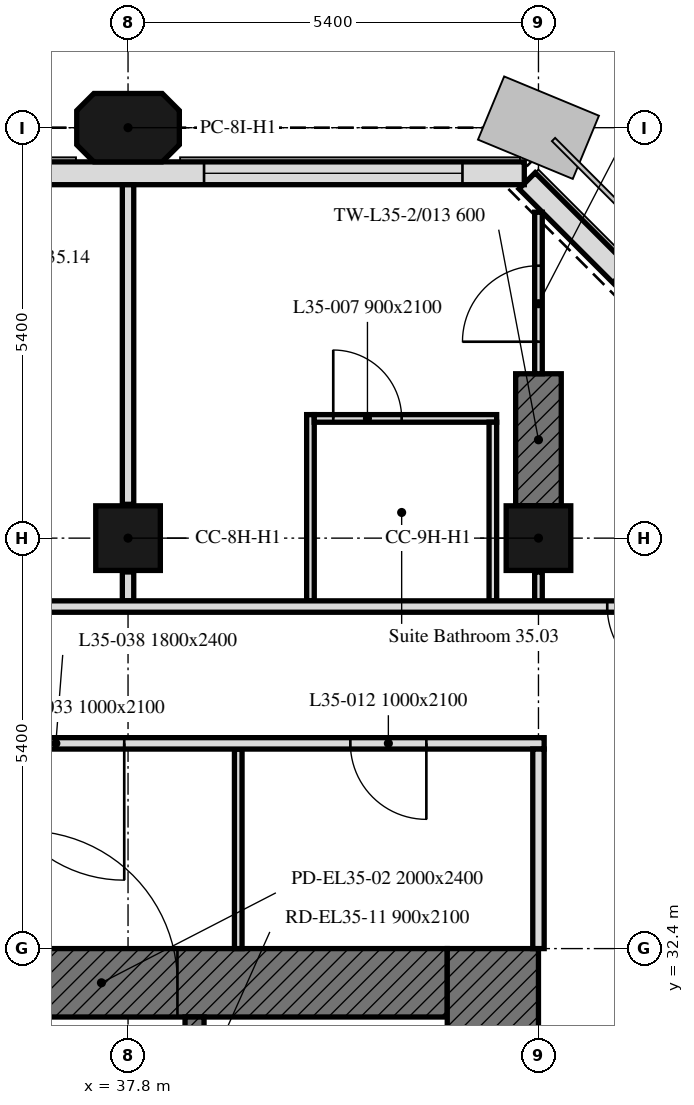
"""IFC4 building model, lengths in metres.
Left out: names, types, materials, properties, quantities, classifications, styles, units other than length and angle.
Written with IfcOpenShell. Run it as: python <this file> out.ifc"""

import sys

from ifc_helpers import new_model, si_unit, direction, frame, frame_2d, origin, origin_2d, place, context, subcontext, project, spatial, polyline, rectangle, outline, extrude, element, fill, save


model = new_model("IFC4")
c1 = context("Model", 3, precision=1e-05, world=origin(), true_north=direction((0.0, 1.0)))
c2 = subcontext(c1, "Body", "Model", "MODEL_VIEW")
j1 = project(units=[si_unit("LENGTHUNIT", "METRE"), si_unit("PLANEANGLEUNIT", "RADIAN")], contexts=[c1])
p1 = place(None, origin())
s1 = spatial("IfcSite", under=j1, at=p1, CompositionType="ELEMENT")
p2 = place(p1, origin())
s2 = spatial("IfcBuilding", under=s1, at=p2, CompositionType="ELEMENT")
p3 = place(p2, frame((0.0, 0.0, 152.8)))
s3 = spatial("IfcBuildingStorey", under=s2, at=p3, CompositionType="ELEMENT", Elevation=152.8)
for number, where, z_axis, x_axis in (
    (1, (37.8, 37.8, 0.0), (0.0, 0.0, 1.0), (1.0, 0.0, 0.0)),
    (2, (43.2, 37.8, 0.0), (0.0, 0.0, 1.0), (1.0, 0.0, 0.0)),
):
    element("IfcColumn", number, at=place(p3, frame(where, z_axis=z_axis, x_axis=x_axis)), inside=s3, PredefinedType="COLUMN", context=c2, shape_type="SweptSolid", body=[
        extrude(rectangle(XDim=0.85, YDim=0.85, at=origin_2d()), origin(), (0.0, 0.0, 1.0), 3.0),
    ])
p4 = place(p3, frame((37.8, 43.2, 0.0), z_axis=(0.0, 0.0, 1.0), x_axis=(1.0, 0.0, 0.0)))
e3 = element("IfcColumn", 3, at=p4, inside=s3, PredefinedType="COLUMN", context=c2, shape_type="SweptSolid", body=[
    extrude(outline(polyline([(-0.45, -0.45), (0.45, -0.45), (0.675, -0.225), (0.675, 0.225), (0.45, 0.45), (-0.45, 0.45), (-0.675, 0.225), (-0.675, -0.225), (-0.45, -0.45)])), origin(), (0.0, 0.0, 1.0), 3.0),
])
p5 = place(p3, frame((43.2, 38.225, 0.0), z_axis=(0.0, 0.0, 1.0), x_axis=(0.0, 1.0, 0.0)))
e4 = element("IfcWall", 4, at=p5, inside=s3, PredefinedType="SHEAR", context=c2, shape_type="SweptSolid", body=[
    extrude(rectangle(XDim=1.737, YDim=0.6, at=frame_2d((0.869, 0.0))), origin(), (0.0, 0.0, 1.0), 3.0),
])
p6 = place(p3, frame((47.901, 37.65, 0.0), z_axis=(0.0, 0.0, 1.0), x_axis=(-0.707106781187, 0.707106781187, 0.0)))
e5 = element("IfcWall", 5, at=p6, inside=s3, PredefinedType="SOLIDWALL", context=c2, shape_type="SweptSolid", body=[
    extrude(rectangle(XDim=6.86, YDim=0.3, at=frame_2d((3.43, 0.0))), origin(), (0.0, 0.0, 1.0), 3.0),
])
p7 = place(p6, frame((1.73, 0.0, 0.9)))
e6 = element("IfcOpeningElement", 6, at=p7, cuts=e5, PredefinedType="OPENING", context=c2, shape_type="SweptSolid", body=[
    extrude(rectangle(XDim=3.4, YDim=1.7, at=frame_2d((1.7, 0.85))), frame((0.0, 0.16, 0.0), z_axis=(0.0, -1.0, 0.0), x_axis=(1.0, 0.0, 0.0)), (0.0, 0.0, 1.0), 0.32),
])
p8 = place(p3, frame((43.014, 42.6, 0.0), z_axis=(0.0, 0.0, 1.0), x_axis=(-1.0, 0.0, 0.0)))
e7 = element("IfcWall", 7, at=p8, inside=s3, PredefinedType="SOLIDWALL", context=c2, shape_type="SweptSolid", body=[
    extrude(rectangle(XDim=32.027, YDim=0.3, at=frame_2d((16.014, 0.0))), origin(), (0.0, 0.0, 1.0), 3.0),
])
p9 = place(p8, frame((0.814, 0.0, 0.9)))
e8 = element("IfcOpeningElement", 8, at=p9, cuts=e7, PredefinedType="OPENING", context=c2, shape_type="SweptSolid", body=[
    extrude(rectangle(XDim=3.4, YDim=1.7, at=frame_2d((1.7, 0.85))), frame((0.0, 0.16, 0.0), z_axis=(0.0, -1.0, 0.0), x_axis=(1.0, 0.0, 0.0)), (0.0, 0.0, 1.0), 0.32),
])
p10 = place(p8, frame((6.564, 0.0, 0.9)))
e9 = element("IfcOpeningElement", 9, at=p10, cuts=e7, PredefinedType="OPENING", context=c2, shape_type="SweptSolid", body=[
    extrude(rectangle(XDim=1.1, YDim=1.7, at=frame_2d((0.55, 0.85))), frame((0.0, 0.16, 0.0), z_axis=(0.0, -1.0, 0.0), x_axis=(1.0, 0.0, 0.0)), (0.0, 0.0, 1.0), 0.32),
])
p11 = place(p8, frame((11.614, 0.0, 0.9)))
e10 = element("IfcOpeningElement", 10, at=p11, cuts=e7, PredefinedType="OPENING", context=c2, shape_type="SweptSolid", body=[
    extrude(rectangle(XDim=3.4, YDim=1.7, at=frame_2d((1.7, 0.85))), frame((0.0, 0.16, 0.0), z_axis=(0.0, -1.0, 0.0), x_axis=(1.0, 0.0, 0.0)), (0.0, 0.0, 1.0), 0.32),
])
p12 = place(p8, frame((17.364, 0.0, 0.9)))
e11 = element("IfcOpeningElement", 11, at=p12, cuts=e7, PredefinedType="OPENING", context=c2, shape_type="SweptSolid", body=[
    extrude(rectangle(XDim=1.1, YDim=1.7, at=frame_2d((0.55, 0.85))), frame((0.0, 0.16, 0.0), z_axis=(0.0, -1.0, 0.0), x_axis=(1.0, 0.0, 0.0)), (0.0, 0.0, 1.0), 0.32),
])
p13 = place(p8, frame((22.414, 0.0, 0.9)))
e12 = element("IfcOpeningElement", 12, at=p13, cuts=e7, PredefinedType="OPENING", context=c2, shape_type="SweptSolid", body=[
    extrude(rectangle(XDim=3.4, YDim=1.7, at=frame_2d((1.7, 0.85))), frame((0.0, 0.16, 0.0), z_axis=(0.0, -1.0, 0.0), x_axis=(1.0, 0.0, 0.0)), (0.0, 0.0, 1.0), 0.32),
])
p14 = place(p8, frame((28.164, 0.0, 0.9)))
e13 = element("IfcOpeningElement", 13, at=p14, cuts=e7, PredefinedType="OPENING", context=c2, shape_type="SweptSolid", body=[
    extrude(rectangle(XDim=1.1, YDim=1.7, at=frame_2d((0.55, 0.85))), frame((0.0, 0.16, 0.0), z_axis=(0.0, -1.0, 0.0), x_axis=(1.0, 0.0, 0.0)), (0.0, 0.0, 1.0), 0.32),
])
p15 = place(p3, frame((30.9, 31.95, 0.0), z_axis=(0.0, 0.0, 1.0), x_axis=(1.0, 0.0, 0.0)))
e14 = element("IfcWall", 14, at=p15, inside=s3, PredefinedType="SOLIDWALL", context=c2, shape_type="SweptSolid", body=[
    extrude(rectangle(XDim=11.1, YDim=0.9, at=frame_2d((5.55, 0.0))), origin(), (0.0, 0.0, 1.0), 3.0),
])
p16 = place(p15, frame((5.55, 0.0, 0.0)))
e15 = element("IfcOpeningElement", 15, at=p16, cuts=e14, PredefinedType="OPENING", context=c2, shape_type="SweptSolid", body=[
    extrude(rectangle(XDim=2.0, YDim=2.4, at=frame_2d((1.0, 1.2))), frame((0.0, 0.45, 0.0), z_axis=(0.0, -1.0, 0.0), x_axis=(1.0, 0.0, 0.0)), (0.0, 0.0, 1.0), 0.9),
])
p17 = place(p3, frame((42.6, 32.4, 0.0), z_axis=(0.0, 0.0, 1.0), x_axis=(0.0, -1.0, 0.0)))
e16 = element("IfcWall", 16, at=p17, inside=s3, PredefinedType="SOLIDWALL", context=c2, shape_type="SweptSolid", body=[
    extrude(rectangle(XDim=16.2, YDim=1.2, at=frame_2d((8.1, 0.0))), origin(), (0.0, 0.0, 1.0), 3.0),
])
p18 = place(p3, frame((38.675, 17.1, 0.0), z_axis=(0.0, 0.0, 1.0), x_axis=(0.0, 1.0, 0.0)))
e17 = element("IfcWall", 17, at=p18, inside=s3, PredefinedType="SOLIDWALL", context=c2, shape_type="SweptSolid", body=[
    extrude(rectangle(XDim=14.4, YDim=0.25, at=frame_2d((7.2, 0.0))), origin(), (0.0, 0.0, 1.0), 3.0),
])
p19 = place(p18, frame((4.6, 0.0, 0.0)))
e18 = element("IfcOpeningElement", 18, at=p19, cuts=e17, PredefinedType="OPENING", context=c2, shape_type="SweptSolid", body=[
    extrude(rectangle(XDim=1.0, YDim=2.1, at=frame_2d((0.5, 1.05))), frame((0.0, 0.125, 0.0), z_axis=(0.0, -1.0, 0.0), x_axis=(1.0, 0.0, 0.0)), (0.0, 0.0, 1.0), 0.25),
])
p20 = place(p18, frame((7.062, 0.0, 0.0)))
e19 = element("IfcOpeningElement", 19, at=p20, cuts=e17, PredefinedType="OPENING", context=c2, shape_type="SweptSolid", body=[
    extrude(rectangle(XDim=1.2, YDim=2.1, at=frame_2d((0.6, 1.05))), frame((0.0, 0.125, 0.0), z_axis=(0.0, -1.0, 0.0), x_axis=(1.0, 0.0, 0.0)), (0.0, 0.0, 1.0), 0.25),
])
p21 = place(p18, frame((9.599, 0.0, 0.0)))
e20 = element("IfcOpeningElement", 20, at=p21, cuts=e17, PredefinedType="OPENING", context=c2, shape_type="SweptSolid", body=[
    extrude(rectangle(XDim=0.9, YDim=2.1, at=frame_2d((0.45, 1.05))), frame((0.0, 0.125, 0.0), z_axis=(0.0, -1.0, 0.0), x_axis=(1.0, 0.0, 0.0)), (0.0, 0.0, 1.0), 0.25),
])
p22 = place(p18, frame((11.032, 0.0, 0.0)))
e21 = element("IfcOpeningElement", 21, at=p22, cuts=e17, PredefinedType="OPENING", context=c2, shape_type="SweptSolid", body=[
    extrude(rectangle(XDim=0.9, YDim=2.1, at=frame_2d((0.45, 1.05))), frame((0.0, 0.125, 0.0), z_axis=(0.0, -1.0, 0.0), x_axis=(1.0, 0.0, 0.0)), (0.0, 0.0, 1.0), 0.25),
])
p23 = place(p18, frame((12.846, 0.0, 0.0)))
e22 = element("IfcOpeningElement", 22, at=p23, cuts=e17, PredefinedType="OPENING", context=c2, shape_type="SweptSolid", body=[
    extrude(rectangle(XDim=0.9, YDim=2.1, at=frame_2d((0.45, 1.05))), frame((0.0, 0.125, 0.0), z_axis=(0.0, -1.0, 0.0), x_axis=(1.0, 0.0, 0.0)), (0.0, 0.0, 1.0), 0.25),
])
p24 = place(p3, frame((37.8, 36.975, 0.0), z_axis=(0.0, 0.0, 1.0), x_axis=(0.0, 1.0, 0.0)))
e23 = element("IfcWall", 23, at=p24, inside=s3, PredefinedType="PARTITIONING", context=c2, shape_type="SweptSolid", body=[
    extrude(rectangle(XDim=0.38, YDim=0.15, at=frame_2d((0.19, 0.0))), origin(), (0.0, 0.0, 1.0), 3.0),
])
p25 = place(p3, frame((37.8, 38.245, 0.0), z_axis=(0.0, 0.0, 1.0), x_axis=(0.0, 1.0, 0.0)))
e24 = element("IfcWall", 24, at=p25, inside=s3, PredefinedType="PARTITIONING", context=c2, shape_type="SweptSolid", body=[
    extrude(rectangle(XDim=4.204, YDim=0.15, at=frame_2d((2.102, 0.0))), origin(), (0.0, 0.0, 1.0), 3.0),
])
p26 = place(p3, frame((40.2, 36.975, 0.0), z_axis=(0.0, 0.0, 1.0), x_axis=(0.0, 1.0, 0.0)))
e25 = element("IfcWall", 25, at=p26, inside=s3, PredefinedType="PARTITIONING", context=c2, shape_type="SweptSolid", body=[
    extrude(rectangle(XDim=2.45, YDim=0.1, at=frame_2d((1.225, 0.0))), origin(), (0.0, 0.0, 1.0), 3.0),
])
p27 = place(p3, frame((40.25, 39.375, 0.0), z_axis=(0.0, 0.0, 1.0), x_axis=(1.0, 0.0, 0.0)))
e26 = element("IfcWall", 26, at=p27, inside=s3, PredefinedType="PARTITIONING", context=c2, shape_type="SweptSolid", body=[
    extrude(rectangle(XDim=2.4, YDim=0.1, at=frame_2d((1.2, 0.0))), origin(), (0.0, 0.0, 1.0), 3.0),
])
p28 = place(p27, frame((0.25, 0.0, 0.0)))
e27 = element("IfcOpeningElement", 27, at=p28, cuts=e26, PredefinedType="OPENING", context=c2, shape_type="SweptSolid", body=[
    extrude(rectangle(XDim=0.9, YDim=2.1, at=frame_2d((0.45, 1.05))), frame((0.0, 0.05, 0.0), z_axis=(0.0, -1.0, 0.0), x_axis=(1.0, 0.0, 0.0)), (0.0, 0.0, 1.0), 0.1),
])
p29 = place(p3, frame((42.6, 39.325, 0.0), z_axis=(0.0, 0.0, 1.0), x_axis=(0.0, -1.0, 0.0)))
e28 = element("IfcWall", 28, at=p29, inside=s3, PredefinedType="PARTITIONING", context=c2, shape_type="SweptSolid", body=[
    extrude(rectangle(XDim=2.35, YDim=0.1, at=frame_2d((1.175, 0.0))), origin(), (0.0, 0.0, 1.0), 3.0),
])
p30 = place(p3, frame((43.2, 36.975, 0.0), z_axis=(0.0, 0.0, 1.0), x_axis=(0.0, 1.0, 0.0)))
e29 = element("IfcWall", 29, at=p30, inside=s3, PredefinedType="PARTITIONING", context=c2, shape_type="SweptSolid", body=[
    extrude(rectangle(XDim=0.38, YDim=0.1, at=frame_2d((0.19, 0.0))), origin(), (0.0, 0.0, 1.0), 3.0),
])
p31 = place(p3, frame((43.2, 39.962, 0.0), z_axis=(0.0, 0.0, 1.0), x_axis=(0.0, 1.0, 0.0)))
e30 = element("IfcWall", 30, at=p31, inside=s3, PredefinedType="PARTITIONING", context=c2, shape_type="SweptSolid", body=[
    extrude(rectangle(XDim=2.125, YDim=0.1, at=frame_2d((1.063, 0.0))), origin(), (0.0, 0.0, 1.0), 3.0),
])
p32 = place(p31, frame((0.421, 0.0, 0.0)))
e31 = element("IfcOpeningElement", 31, at=p32, cuts=e30, PredefinedType="OPENING", context=c2, shape_type="SweptSolid", body=[
    extrude(rectangle(XDim=1.0, YDim=2.1, at=frame_2d((0.5, 1.05))), frame((0.0, 0.05, 0.0), z_axis=(0.0, -1.0, 0.0), x_axis=(1.0, 0.0, 0.0)), (0.0, 0.0, 1.0), 0.1),
])
p33 = place(p3, frame((47.849, 36.9, 0.0), z_axis=(0.0, 0.0, 1.0), x_axis=(-1.0, 0.0, 0.0)))
e32 = element("IfcWall", 32, at=p33, inside=s3, PredefinedType="PARTITIONING", context=c2, shape_type="SweptSolid", body=[
    extrude(rectangle(XDim=41.698, YDim=0.15, at=frame_2d((20.849, 0.0))), origin(), (0.0, 0.0, 1.0), 3.0),
])
p34 = place(p33, frame((27.649, 0.0, 0.0)))
e33 = element("IfcOpeningElement", 33, at=p34, cuts=e32, PredefinedType="OPENING", context=c2, shape_type="SweptSolid", body=[
    extrude(rectangle(XDim=1.0, YDim=2.1, at=frame_2d((0.5, 1.05))), frame((0.0, 0.075, 0.0), z_axis=(0.0, -1.0, 0.0), x_axis=(1.0, 0.0, 0.0)), (0.0, 0.0, 1.0), 0.15),
])
p35 = place(p33, frame((22.249, 0.0, 0.0)))
e34 = element("IfcOpeningElement", 34, at=p35, cuts=e32, PredefinedType="OPENING", context=c2, shape_type="SweptSolid", body=[
    extrude(rectangle(XDim=1.0, YDim=2.1, at=frame_2d((0.5, 1.05))), frame((0.0, 0.075, 0.0), z_axis=(0.0, -1.0, 0.0), x_axis=(1.0, 0.0, 0.0)), (0.0, 0.0, 1.0), 0.15),
])
p36 = place(p33, frame((16.849, 0.0, 0.0)))
e35 = element("IfcOpeningElement", 35, at=p36, cuts=e32, PredefinedType="OPENING", context=c2, shape_type="SweptSolid", body=[
    extrude(rectangle(XDim=1.0, YDim=2.1, at=frame_2d((0.5, 1.05))), frame((0.0, 0.075, 0.0), z_axis=(0.0, -1.0, 0.0), x_axis=(1.0, 0.0, 0.0)), (0.0, 0.0, 1.0), 0.15),
])
p37 = place(p33, frame((11.449, 0.0, 0.0)))
e36 = element("IfcOpeningElement", 36, at=p37, cuts=e32, PredefinedType="OPENING", context=c2, shape_type="SweptSolid", body=[
    extrude(rectangle(XDim=1.0, YDim=2.1, at=frame_2d((0.5, 1.05))), frame((0.0, 0.075, 0.0), z_axis=(0.0, -1.0, 0.0), x_axis=(1.0, 0.0, 0.0)), (0.0, 0.0, 1.0), 0.15),
])
p38 = place(p33, frame((2.744, 0.0, 0.0)))
e37 = element("IfcOpeningElement", 37, at=p38, cuts=e32, PredefinedType="OPENING", context=c2, shape_type="SweptSolid", body=[
    extrude(rectangle(XDim=1.0, YDim=2.1, at=frame_2d((0.5, 1.05))), frame((0.0, 0.075, 0.0), z_axis=(0.0, -1.0, 0.0), x_axis=(1.0, 0.0, 0.0)), (0.0, 0.0, 1.0), 0.15),
])
p39 = place(p33, frame((39.249, 0.0, 0.0)))
e38 = element("IfcOpeningElement", 38, at=p39, cuts=e32, PredefinedType="OPENING", context=c2, shape_type="SweptSolid", body=[
    extrude(rectangle(XDim=1.0, YDim=2.1, at=frame_2d((0.5, 1.05))), frame((0.0, 0.075, 0.0), z_axis=(0.0, -1.0, 0.0), x_axis=(1.0, 0.0, 0.0)), (0.0, 0.0, 1.0), 0.15),
])
p40 = place(p3, frame((39.25, 32.4, 0.0), z_axis=(0.0, 0.0, 1.0), x_axis=(0.0, 1.0, 0.0)))
e39 = element("IfcWall", 39, at=p40, inside=s3, PredefinedType="PARTITIONING", context=c2, shape_type="SweptSolid", body=[
    extrude(rectangle(XDim=2.625, YDim=0.1, at=frame_2d((1.312, 0.0))), origin(), (0.0, 0.0, 1.0), 3.0),
])
p41 = place(p3, frame((43.275, 35.1, 0.0), z_axis=(0.0, 0.0, 1.0), x_axis=(-1.0, 0.0, 0.0)))
e40 = element("IfcWall", 40, at=p41, inside=s3, PredefinedType="PARTITIONING", context=c2, shape_type="SweptSolid", body=[
    extrude(rectangle(XDim=37.124, YDim=0.15, at=frame_2d((18.562, 0.0))), origin(), (0.0, 0.0, 1.0), 3.0),
])
p42 = place(p41, frame((18.475, 0.0, 0.0)))
e41 = element("IfcOpeningElement", 41, at=p42, cuts=e40, PredefinedType="OPENING", context=c2, shape_type="SweptSolid", body=[
    extrude(rectangle(XDim=1.0, YDim=2.1, at=frame_2d((0.5, 1.05))), frame((0.0, 0.075, 0.0), z_axis=(0.0, -1.0, 0.0), x_axis=(1.0, 0.0, 0.0)), (0.0, 0.0, 1.0), 0.15),
])
p43 = place(p41, frame((34.095, 0.0, 0.0)))
e42 = element("IfcOpeningElement", 42, at=p43, cuts=e40, PredefinedType="OPENING", context=c2, shape_type="SweptSolid", body=[
    extrude(rectangle(XDim=1.0, YDim=2.1, at=frame_2d((0.5, 1.05))), frame((0.0, 0.075, 0.0), z_axis=(0.0, -1.0, 0.0), x_axis=(1.0, 0.0, 0.0)), (0.0, 0.0, 1.0), 0.15),
])
p44 = place(p41, frame((8.75, 0.0, 0.0)))
e43 = element("IfcOpeningElement", 43, at=p44, cuts=e40, PredefinedType="OPENING", context=c2, shape_type="SweptSolid", body=[
    extrude(rectangle(XDim=1.0, YDim=2.1, at=frame_2d((0.5, 1.05))), frame((0.0, 0.075, 0.0), z_axis=(0.0, -1.0, 0.0), x_axis=(1.0, 0.0, 0.0)), (0.0, 0.0, 1.0), 0.15),
])
p45 = place(p41, frame((1.55, 0.0, 0.0)))
e44 = element("IfcOpeningElement", 44, at=p45, cuts=e40, PredefinedType="OPENING", context=c2, shape_type="SweptSolid", body=[
    extrude(rectangle(XDim=1.0, YDim=2.1, at=frame_2d((0.5, 1.05))), frame((0.0, 0.075, 0.0), z_axis=(0.0, -1.0, 0.0), x_axis=(1.0, 0.0, 0.0)), (0.0, 0.0, 1.0), 0.15),
])
p46 = place(p41, frame((28.2, 0.0, 0.0)))
e45 = element("IfcOpeningElement", 45, at=p46, cuts=e40, PredefinedType="OPENING", context=c2, shape_type="SweptSolid", body=[
    extrude(rectangle(XDim=1.0, YDim=2.1, at=frame_2d((0.5, 1.05))), frame((0.0, 0.075, 0.0), z_axis=(0.0, -1.0, 0.0), x_axis=(1.0, 0.0, 0.0)), (0.0, 0.0, 1.0), 0.15),
])
p47 = place(p41, frame((30.625, 0.0, 0.0)))
e46 = element("IfcOpeningElement", 46, at=p47, cuts=e40, PredefinedType="OPENING", context=c2, shape_type="SweptSolid", body=[
    extrude(rectangle(XDim=1.8, YDim=2.4, at=frame_2d((0.9, 1.2))), frame((0.0, 0.075, 0.0), z_axis=(0.0, -1.0, 0.0), x_axis=(1.0, 0.0, 0.0)), (0.0, 0.0, 1.0), 0.15),
])
p48 = place(p41, frame((5.525, 0.0, 0.0)))
e47 = element("IfcOpeningElement", 47, at=p48, cuts=e40, PredefinedType="OPENING", context=c2, shape_type="SweptSolid", body=[
    extrude(rectangle(XDim=1.8, YDim=2.4, at=frame_2d((0.9, 1.2))), frame((0.0, 0.075, 0.0), z_axis=(0.0, -1.0, 0.0), x_axis=(1.0, 0.0, 0.0)), (0.0, 0.0, 1.0), 0.15),
])
p49 = place(p3, frame((43.2, 35.025, 0.0), z_axis=(0.0, 0.0, 1.0), x_axis=(0.0, -1.0, 0.0)))
e48 = element("IfcWall", 48, at=p49, inside=s3, PredefinedType="PARTITIONING", context=c2, shape_type="SweptSolid", body=[
    extrude(rectangle(XDim=2.625, YDim=0.15, at=frame_2d((1.312, 0.0))), origin(), (0.0, 0.0, 1.0), 3.0),
])
p50 = place(p9, origin())
e49 = element("IfcWindow", 49, at=p50, inside=s3, PartitioningType="SINGLE_PANEL", PredefinedType="WINDOW", context=c2, shape_type="SweptSolid", body=[
    extrude(rectangle(XDim=3.4, YDim=1.7, at=frame_2d((1.7, 0.85))), frame((0.0, 0.03, 0.0), z_axis=(0.0, -1.0, 0.0), x_axis=(1.0, 0.0, 0.0)), (0.0, 0.0, 1.0), 0.06),
])
fill(e8, e49)
p51 = place(p16, origin())
e50 = element("IfcDoor", 50, at=p51, inside=s3, OperationType="DOUBLE_DOOR_SINGLE_SWING", PredefinedType="DOOR", context=c2, shape_type="SweptSolid", body=[
    extrude(rectangle(XDim=2.0, YDim=2.4, at=frame_2d((1.0, 1.2))), frame((0.0, 0.025, 0.0), z_axis=(0.0, -1.0, 0.0), x_axis=(1.0, 0.0, 0.0)), (0.0, 0.0, 1.0), 0.05),
])
fill(e15, e50)
p52 = place(p28, origin())
e51 = element("IfcDoor", 51, at=p52, inside=s3, OperationType="SINGLE_SWING_LEFT", PredefinedType="DOOR", context=c2, shape_type="SweptSolid", body=[
    extrude(rectangle(XDim=0.9, YDim=2.1, at=frame_2d((0.45, 1.05))), frame((0.0, 0.025, 0.0), z_axis=(0.0, -1.0, 0.0), x_axis=(1.0, 0.0, 0.0)), (0.0, 0.0, 1.0), 0.05),
])
fill(e27, e51)
p53 = place(p45, origin())
e52 = element("IfcDoor", 52, at=p53, inside=s3, OperationType="SINGLE_SWING_RIGHT", PredefinedType="DOOR", context=c2, shape_type="SweptSolid", body=[
    extrude(rectangle(XDim=1.0, YDim=2.1, at=frame_2d((0.5, 1.05))), frame((0.0, 0.025, 0.0), z_axis=(0.0, -1.0, 0.0), x_axis=(1.0, 0.0, 0.0)), (0.0, 0.0, 1.0), 0.05),
])
fill(e44, e52)
p54 = place(p32, origin())
e53 = element("IfcDoor", 53, at=p54, inside=s3, OperationType="SINGLE_SWING_LEFT", PredefinedType="DOOR", context=c2, shape_type="SweptSolid", body=[
    extrude(rectangle(XDim=1.0, YDim=2.1, at=frame_2d((0.5, 1.05))), frame((0.0, 0.025, 0.0), z_axis=(0.0, -1.0, 0.0), x_axis=(1.0, 0.0, 0.0)), (0.0, 0.0, 1.0), 0.05),
])
fill(e31, e53)
p55 = place(p38, origin())
e54 = element("IfcDoor", 54, at=p55, inside=s3, OperationType="SINGLE_SWING_LEFT", PredefinedType="DOOR", context=c2, shape_type="SweptSolid", body=[
    extrude(rectangle(XDim=1.0, YDim=2.1, at=frame_2d((0.5, 1.05))), frame((0.0, 0.025, 0.0), z_axis=(0.0, -1.0, 0.0), x_axis=(1.0, 0.0, 0.0)), (0.0, 0.0, 1.0), 0.05),
])
fill(e37, e54)
p56 = place(p48, origin())
e55 = element("IfcDoor", 55, at=p56, inside=s3, OperationType="DOUBLE_DOOR_SINGLE_SWING", PredefinedType="DOOR", context=c2, shape_type="SweptSolid", body=[
    extrude(rectangle(XDim=1.8, YDim=2.4, at=frame_2d((0.9, 1.2))), frame((0.0, 0.025, 0.0), z_axis=(0.0, -1.0, 0.0), x_axis=(1.0, 0.0, 0.0)), (0.0, 0.0, 1.0), 0.05),
])
fill(e47, e55)
save(model, sys.argv[1])
